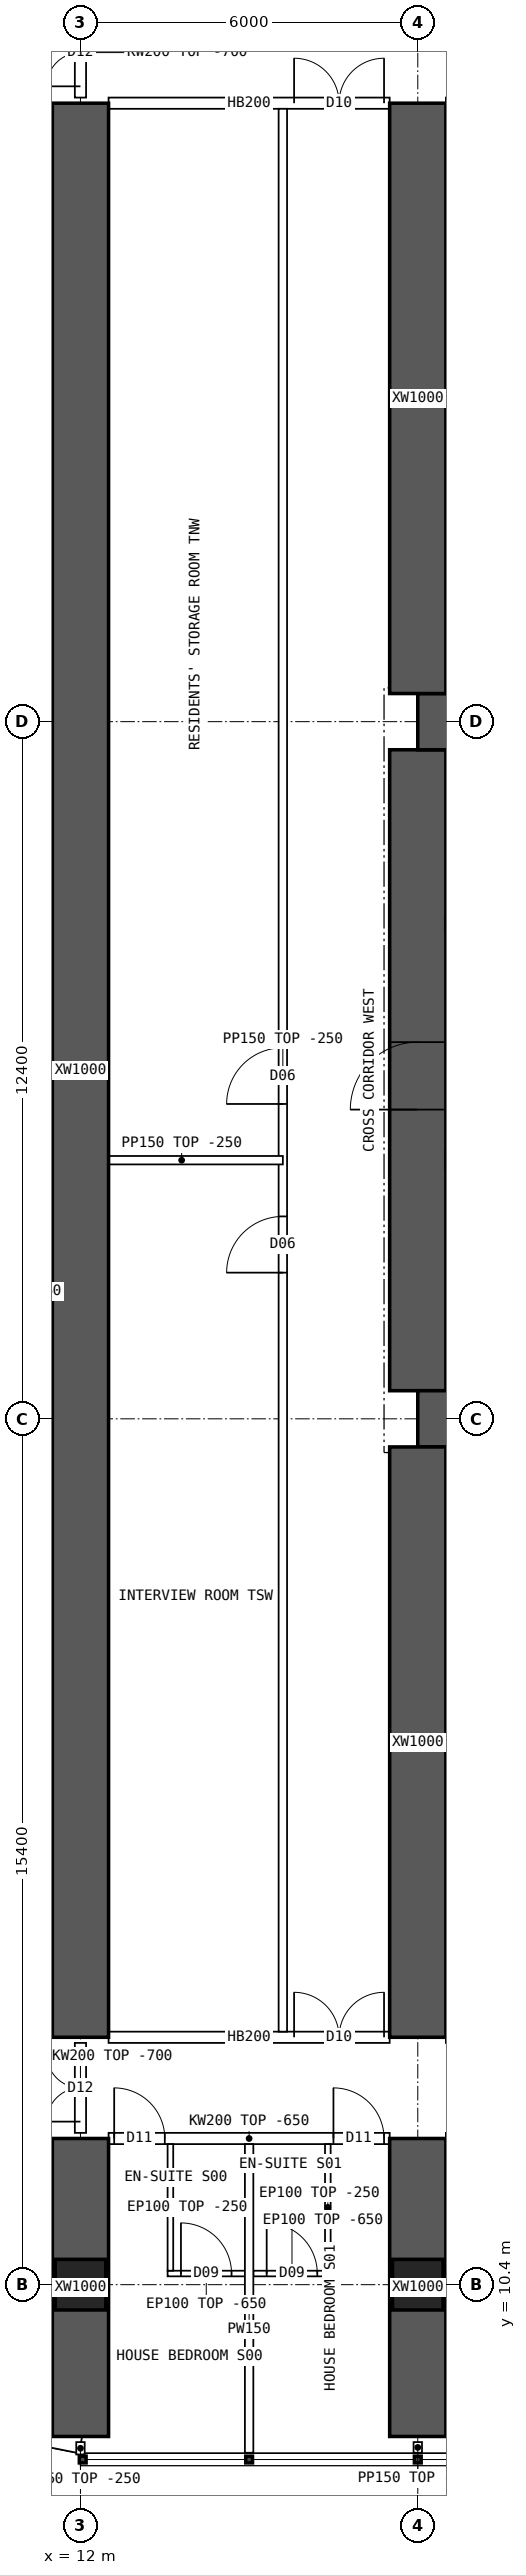
"""IFC4 building model, lengths in metres.
Left out: names, types, materials, properties, quantities, classifications, styles, units other than length and angle.
Written with IfcOpenShell. Run it as: python <this file> out.ifc"""

import sys

from ifc_helpers import new_model, si_unit, direction, frame, frame_2d, origin, origin_2d, place, context, subcontext, project, spatial, polyline, rectangle, hollow_rectangle, outline, extrude, element, fill, save


model = new_model("IFC4")
c1 = context("Model", 3, precision=1e-05, world=origin(), true_north=direction((0.0, 1.0)))
c2 = subcontext(c1, "Body", "Model", "MODEL_VIEW")
j1 = project(units=[si_unit("LENGTHUNIT", "METRE"), si_unit("PLANEANGLEUNIT", "RADIAN")], contexts=[c1])
p1 = place(None, origin())
s1 = spatial("IfcSite", under=j1, at=p1, CompositionType="ELEMENT")
p2 = place(p1, origin())
s2 = spatial("IfcBuilding", under=s1, at=p2, CompositionType="ELEMENT")
p3 = place(p2, frame((0.0, 0.0, 31.45)))
s3 = spatial("IfcBuildingStorey", under=s2, at=p3, CompositionType="ELEMENT", Elevation=31.45)
for number, where, z_axis, x_axis in (
    (1, (12.0, 10.4, 0.0), (0.0, 0.0, 1.0), (1.0, 0.0, 0.0)),
    (2, (18.0, 10.4, 0.0), (0.0, 0.0, 1.0), (1.0, 0.0, 0.0)),
):
    element("IfcColumn", number, at=place(p3, frame(where, z_axis=z_axis, x_axis=x_axis)), inside=s3, PredefinedType="COLUMN", context=c2, shape_type="SweptSolid", body=[
        extrude(hollow_rectangle(XDim=0.9, YDim=0.9, WallThickness=0.09, at=origin_2d()), origin(), (0.0, 0.0, 1.0), 3.75),
    ])
for number, where, z_axis, x_axis in (
    (3, (18.0, 25.8, 0.0), (0.0, 0.0, 1.0), (1.0, 0.0, 0.0)),
    (4, (18.0, 38.2, 0.0), (0.0, 0.0, 1.0), (1.0, 0.0, 0.0)),
):
    element("IfcWall", number, at=place(p3, frame(where, z_axis=z_axis, x_axis=x_axis)), inside=s3, PredefinedType="SHEAR", context=c2, shape_type="SweptSolid", body=[
        extrude(rectangle(XDim=48.0, YDim=1.0, at=frame_2d((24.0, 0.0))), origin(), (0.0, 0.0, 1.0), 3.75),
    ])
p4 = place(p3, frame((18.0, 26.3, 0.0), z_axis=(0.0, 0.0, 1.0), x_axis=(0.0, 1.0, 0.0)))
e5 = element("IfcWall", 5, at=p4, inside=s3, PredefinedType="SHEAR", context=c2, shape_type="SweptSolid", body=[
    extrude(rectangle(XDim=11.4, YDim=1.0, at=frame_2d((5.7, 0.0))), origin(), (0.0, 0.0, 1.0), 3.75),
])
p5 = place(p4, frame((5.0, 0.0, 0.0)))
e6 = element("IfcOpeningElement", 6, at=p5, cuts=e5, PredefinedType="OPENING", context=c2, shape_type="SweptSolid", body=[
    extrude(rectangle(XDim=1.2, YDim=2.1, at=frame_2d((0.6, 1.05))), frame((0.0, 0.51, 0.0), z_axis=(0.0, -1.0, 0.0), x_axis=(1.0, 0.0, 0.0)), (0.0, 0.0, 1.0), 1.02),
])
p6 = place(p3, frame((12.0, 7.7, 0.0), z_axis=(0.0, 0.0, 1.0), x_axis=(0.0, 1.0, 0.0)))
e7 = element("IfcWall", 7, at=p6, inside=s3, PredefinedType="SHEAR", context=c2, shape_type="SweptSolid", body=[
    extrude(rectangle(XDim=5.3, YDim=1.0, at=frame_2d((2.65, 0.0))), origin(), (0.0, 0.0, 1.0), 3.75),
])
p7 = place(p3, frame((12.0, 14.8, 0.0), z_axis=(0.0, 0.0, 1.0), x_axis=(0.0, 1.0, 0.0)))
e8 = element("IfcWall", 8, at=p7, inside=s3, PredefinedType="SHEAR", context=c2, shape_type="SweptSolid", body=[
    extrude(rectangle(XDim=34.4, YDim=1.0, at=frame_2d((17.2, 0.0))), origin(), (0.0, 0.0, 1.0), 3.75),
])
p8 = place(p3, frame((18.0, 7.7, 0.0), z_axis=(0.0, 0.0, 1.0), x_axis=(0.0, 1.0, 0.0)))
e9 = element("IfcWall", 9, at=p8, inside=s3, PredefinedType="SHEAR", context=c2, shape_type="SweptSolid", body=[
    extrude(rectangle(XDim=5.3, YDim=1.0, at=frame_2d((2.65, 0.0))), origin(), (0.0, 0.0, 1.0), 3.75),
])
for number, where, z_axis, x_axis in (
    (10, (18.0, 14.8, 0.0), (0.0, 0.0, 1.0), (0.0, 1.0, 0.0)),
    (11, (18.0, 38.7, 0.0), (0.0, 0.0, 1.0), (0.0, 1.0, 0.0)),
):
    element("IfcWall", number, at=place(p3, frame(where, z_axis=z_axis, x_axis=x_axis)), inside=s3, PredefinedType="SHEAR", context=c2, shape_type="SweptSolid", body=[
        extrude(rectangle(XDim=10.5, YDim=1.0, at=frame_2d((5.25, 0.0))), origin(), (0.0, 0.0, 1.0), 3.75),
    ])
p9 = place(p3, frame((8.843, 8.178, 0.0), z_axis=(0.0, 0.0, 1.0), x_axis=(0.980787251524, -0.195080412259, 0.0)))
e12 = element("IfcWall", 12, at=p9, inside=s3, PredefinedType="SOLIDWALL", context=c2, shape_type="SweptSolid", body=[
    extrude(outline(polyline([(-0.03, -0.15), (3.249, -0.15), (3.189, 0.15), (0.03, 0.15), (-0.03, -0.15)])), origin(), (0.0, 0.0, 1.0), 3.5),
])
p10 = place(p9, frame((0.909, 0.0, 0.9)))
e13 = element("IfcOpeningElement", 13, at=p10, cuts=e12, PredefinedType="OPENING", context=c2, shape_type="SweptSolid", body=[
    extrude(rectangle(XDim=1.4, YDim=1.8, at=frame_2d((0.7, 0.9))), frame((0.0, 0.16, 0.0), z_axis=(0.0, -1.0, 0.0), x_axis=(1.0, 0.0, 0.0)), (0.0, 0.0, 1.0), 0.32),
])
p11 = place(p3, frame((12.5, 13.0, 0.0), z_axis=(0.0, 0.0, 1.0), x_axis=(1.0, 0.0, 0.0)))
e14 = element("IfcWall", 14, at=p11, inside=s3, PredefinedType="SOLIDWALL", context=c2, shape_type="SweptSolid", body=[
    extrude(outline(polyline([(0.0, 0.0), (5.0, 0.0), (5.0, 3.1), (0.0, 3.1), (0.0, 0.0)])), frame((0.0, 0.1, 0.0), z_axis=(0.0, -1.0, 0.0), x_axis=(1.0, 0.0, 0.0)), (0.0, 0.0, 1.0), 0.2),
])
p12 = place(p11, frame((0.1, 0.0, 0.0)))
e15 = element("IfcOpeningElement", 15, at=p12, cuts=e14, PredefinedType="OPENING", context=c2, shape_type="SweptSolid", body=[
    extrude(rectangle(XDim=0.9, YDim=2.1, at=frame_2d((0.45, 1.05))), frame((0.0, 0.11, 0.0), z_axis=(0.0, -1.0, 0.0), x_axis=(1.0, 0.0, 0.0)), (0.0, 0.0, 1.0), 0.22),
])
p13 = place(p11, frame((4.0, 0.0, 0.0)))
e16 = element("IfcOpeningElement", 16, at=p13, cuts=e14, PredefinedType="OPENING", context=c2, shape_type="SweptSolid", body=[
    extrude(rectangle(XDim=0.9, YDim=2.1, at=frame_2d((0.45, 1.05))), frame((0.0, 0.11, 0.0), z_axis=(0.0, -1.0, 0.0), x_axis=(1.0, 0.0, 0.0)), (0.0, 0.0, 1.0), 0.22),
])
p14 = place(p3, frame((12.5, 14.8, 0.0), z_axis=(0.0, 0.0, 1.0), x_axis=(1.0, 0.0, 0.0)))
e17 = element("IfcWall", 17, at=p14, inside=s3, PredefinedType="SOLIDWALL", context=c2, shape_type="SweptSolid", body=[
    extrude(rectangle(XDim=5.0, YDim=0.2, at=frame_2d((2.5, 0.0))), origin(), (0.0, 0.0, 1.0), 3.5),
])
p15 = place(p14, frame((3.3, 0.0, 0.0)))
e18 = element("IfcOpeningElement", 18, at=p15, cuts=e17, PredefinedType="OPENING", context=c2, shape_type="SweptSolid", body=[
    extrude(rectangle(XDim=1.6, YDim=2.1, at=frame_2d((0.8, 1.05))), frame((0.0, 0.11, 0.0), z_axis=(0.0, -1.0, 0.0), x_axis=(1.0, 0.0, 0.0)), (0.0, 0.0, 1.0), 0.22),
])
p16 = place(p3, frame((12.5, 49.2, 0.0), z_axis=(0.0, 0.0, 1.0), x_axis=(1.0, 0.0, 0.0)))
e19 = element("IfcWall", 19, at=p16, inside=s3, PredefinedType="SOLIDWALL", context=c2, shape_type="SweptSolid", body=[
    extrude(rectangle(XDim=5.0, YDim=0.2, at=frame_2d((2.5, 0.0))), origin(), (0.0, 0.0, 1.0), 3.5),
])
p17 = place(p16, frame((3.3, 0.0, 0.0)))
e20 = element("IfcOpeningElement", 20, at=p17, cuts=e19, PredefinedType="OPENING", context=c2, shape_type="SweptSolid", body=[
    extrude(rectangle(XDim=1.6, YDim=2.1, at=frame_2d((0.8, 1.05))), frame((0.0, 0.11, 0.0), z_axis=(0.0, -1.0, 0.0), x_axis=(1.0, 0.0, 0.0)), (0.0, 0.0, 1.0), 0.22),
])
p18 = place(p3, frame((15.0, 7.41, 0.0), z_axis=(0.0, 0.0, 1.0), x_axis=(0.0, 1.0, 0.0)))
e21 = element("IfcWall", 21, at=p18, inside=s3, PredefinedType="PARTITIONING", context=c2, shape_type="SweptSolid", body=[
    extrude(outline(polyline([(0.0, 0.0), (5.49, 0.0), (5.49, 3.1), (5.442, 3.1), (5.44, 3.5), (3.192, 3.5), (3.19, 3.1), (2.792, 3.1), (2.79, 3.5), (0.0, 3.5), (0.0, 0.0)])), frame((0.0, 0.075, 0.0), z_axis=(0.0, -1.0, 0.0), x_axis=(1.0, 0.0, 0.0)), (0.0, 0.0, 1.0), 0.15),
])
p19 = place(p3, frame((14.925, 10.598, 0.0), z_axis=(0.0, 0.0, 1.0), x_axis=(-1.0, 0.0, 0.0)))
e22 = element("IfcWall", 22, at=p19, inside=s3, PredefinedType="PARTITIONING", context=c2, shape_type="SweptSolid", body=[
    extrude(outline(polyline([(0.0, 0.0), (1.375, 0.0), (1.375, 3.1), (0.0, 3.1), (0.0, 0.0)])), frame((0.0, 0.05, 0.0), z_axis=(0.0, -1.0, 0.0), x_axis=(1.0, 0.0, 0.0)), (0.0, 0.0, 1.0), 0.1),
])
p20 = place(p19, frame((0.238, 0.0, 0.0)))
e23 = element("IfcOpeningElement", 23, at=p20, cuts=e22, PredefinedType="OPENING", context=c2, shape_type="SweptSolid", body=[
    extrude(rectangle(XDim=0.9, YDim=2.1, at=frame_2d((0.45, 1.05))), frame((0.0, 0.06, 0.0), z_axis=(0.0, -1.0, 0.0), x_axis=(1.0, 0.0, 0.0)), (0.0, 0.0, 1.0), 0.12),
])
p21 = place(p3, frame((13.6, 10.648, 0.0), z_axis=(0.0, 0.0, 1.0), x_axis=(0.0, 1.0, 0.0)))
e24 = element("IfcWall", 24, at=p21, inside=s3, PredefinedType="PARTITIONING", context=c2, shape_type="SweptSolid", body=[
    extrude(outline(polyline([(0.0, 0.0), (2.252, 0.0), (2.252, 3.1), (2.204, 3.1), (2.202, 3.5), (0.0, 3.5), (0.0, 0.0)])), frame((0.0, 0.05, 0.0), z_axis=(0.0, -1.0, 0.0), x_axis=(1.0, 0.0, 0.0)), (0.0, 0.0, 1.0), 0.1),
])
p22 = place(p3, frame((16.45, 10.598, 0.0), z_axis=(0.0, 0.0, 1.0), x_axis=(-1.0, 0.0, 0.0)))
e25 = element("IfcWall", 25, at=p22, inside=s3, PredefinedType="PARTITIONING", context=c2, shape_type="SweptSolid", body=[
    extrude(outline(polyline([(0.0, 0.0), (1.375, 0.0), (1.375, 3.1), (0.0, 3.1), (0.0, 0.0)])), frame((0.0, 0.05, 0.0), z_axis=(0.0, -1.0, 0.0), x_axis=(1.0, 0.0, 0.0)), (0.0, 0.0, 1.0), 0.1),
])
p23 = place(p22, frame((0.238, 0.0, 0.0)))
e26 = element("IfcOpeningElement", 26, at=p23, cuts=e25, PredefinedType="OPENING", context=c2, shape_type="SweptSolid", body=[
    extrude(rectangle(XDim=0.9, YDim=2.1, at=frame_2d((0.45, 1.05))), frame((0.0, 0.06, 0.0), z_axis=(0.0, -1.0, 0.0), x_axis=(1.0, 0.0, 0.0)), (0.0, 0.0, 1.0), 0.12),
])
p24 = place(p3, frame((16.4, 10.648, 0.0), z_axis=(0.0, 0.0, 1.0), x_axis=(0.0, 1.0, 0.0)))
e27 = element("IfcWall", 27, at=p24, inside=s3, PredefinedType="PARTITIONING", context=c2, shape_type="SweptSolid", body=[
    extrude(outline(polyline([(0.0, 0.0), (2.252, 0.0), (2.252, 3.1), (2.204, 3.1), (2.202, 3.5), (0.0, 3.5), (0.0, 0.0)])), frame((0.0, 0.05, 0.0), z_axis=(0.0, -1.0, 0.0), x_axis=(1.0, 0.0, 0.0)), (0.0, 0.0, 1.0), 0.1),
])
p25 = place(p3, frame((15.6, 14.9, 0.0), z_axis=(0.0, 0.0, 1.0), x_axis=(0.0, 1.0, 0.0)))
e28 = element("IfcWall", 28, at=p25, inside=s3, PredefinedType="PARTITIONING", context=c2, shape_type="SweptSolid", body=[
    extrude(rectangle(XDim=34.2, YDim=0.15, at=frame_2d((17.1, 0.0))), origin(), (0.0, 0.0, 1.0), 3.5),
])
p26 = place(p25, frame((13.5, 0.0, 0.0)))
e29 = element("IfcOpeningElement", 29, at=p26, cuts=e28, PredefinedType="OPENING", context=c2, shape_type="SweptSolid", body=[
    extrude(rectangle(XDim=1.0, YDim=2.1, at=frame_2d((0.5, 1.05))), frame((0.0, 0.085, 0.0), z_axis=(0.0, -1.0, 0.0), x_axis=(1.0, 0.0, 0.0)), (0.0, 0.0, 1.0), 0.17),
])
p27 = place(p25, frame((16.5, 0.0, 0.0)))
e30 = element("IfcOpeningElement", 30, at=p27, cuts=e28, PredefinedType="OPENING", context=c2, shape_type="SweptSolid", body=[
    extrude(rectangle(XDim=1.0, YDim=2.1, at=frame_2d((0.5, 1.05))), frame((0.0, 0.085, 0.0), z_axis=(0.0, -1.0, 0.0), x_axis=(1.0, 0.0, 0.0)), (0.0, 0.0, 1.0), 0.17),
])
p28 = place(p3, frame((12.0, 30.4, 0.0), z_axis=(0.0, 0.0, 1.0), x_axis=(1.0, 0.0, 0.0)))
e31 = element("IfcWall", 31, at=p28, inside=s3, PredefinedType="PARTITIONING", context=c2, shape_type="SweptSolid", body=[
    extrude(rectangle(XDim=3.6, YDim=0.15, at=frame_2d((1.8, 0.0))), origin(), (0.0, 0.0, 1.0), 3.5),
])
p29 = place(p3, frame((3.905, 30.85, 0.0), z_axis=(0.0, 0.0, 1.0), x_axis=(1.0, 0.0, 0.0)))
e32 = element("IfcWall", 32, at=p29, inside=s3, PredefinedType="PARTITIONING", context=c2, shape_type="SweptSolid", body=[
    extrude(outline(polyline([(0.0, 0.0), (8.02, 0.0), (8.02, 3.5), (2.397, 3.5), (2.395, 3.05), (1.797, 3.05), (1.795, 3.5), (0.0, 3.5), (0.0, 0.0)])), frame((0.0, 0.075, 0.0), z_axis=(0.0, -1.0, 0.0), x_axis=(1.0, 0.0, 0.0)), (0.0, 0.0, 1.0), 0.15),
])
p30 = place(p3, frame((12.0, 13.1, 0.0), z_axis=(0.0, 0.0, 1.0), x_axis=(0.0, 1.0, 0.0)))
e33 = element("IfcWall", 33, at=p30, inside=s3, PredefinedType="SOLIDWALL", context=c2, shape_type="SweptSolid", body=[
    extrude(outline(polyline([(0.0, 0.0), (1.6, 0.0), (1.6, 3.05), (0.0, 3.05), (0.0, 0.0)])), frame((0.0, 0.1, 0.0), z_axis=(0.0, -1.0, 0.0), x_axis=(1.0, 0.0, 0.0)), (0.0, 0.0, 1.0), 0.2),
])
p31 = place(p30, frame((0.2, 0.0, 0.0)))
e34 = element("IfcOpeningElement", 34, at=p31, cuts=e33, PredefinedType="OPENING", context=c2, shape_type="SweptSolid", body=[
    extrude(rectangle(XDim=1.2, YDim=2.1, at=frame_2d((0.6, 1.05))), frame((0.0, 0.11, 0.0), z_axis=(0.0, -1.0, 0.0), x_axis=(1.0, 0.0, 0.0)), (0.0, 0.0, 1.0), 0.22),
])
p32 = place(p3, frame((12.0, 49.3, 0.0), z_axis=(0.0, 0.0, 1.0), x_axis=(0.0, 1.0, 0.0)))
e35 = element("IfcWall", 35, at=p32, inside=s3, PredefinedType="SOLIDWALL", context=c2, shape_type="SweptSolid", body=[
    extrude(outline(polyline([(0.0, 0.0), (1.6, 0.0), (1.6, 3.05), (0.0, 3.05), (0.0, 0.0)])), frame((0.0, 0.1, 0.0), z_axis=(0.0, -1.0, 0.0), x_axis=(1.0, 0.0, 0.0)), (0.0, 0.0, 1.0), 0.2),
])
p33 = place(p32, frame((0.2, 0.0, 0.0)))
e36 = element("IfcOpeningElement", 36, at=p33, cuts=e35, PredefinedType="OPENING", context=c2, shape_type="SweptSolid", body=[
    extrude(rectangle(XDim=1.2, YDim=2.1, at=frame_2d((0.6, 1.05))), frame((0.0, 0.11, 0.0), z_axis=(0.0, -1.0, 0.0), x_axis=(1.0, 0.0, 0.0)), (0.0, 0.0, 1.0), 0.22),
])
p34 = place(p3, frame((12.0, 7.6, 0.0), z_axis=(0.0, 0.0, 1.0), x_axis=(0.0, -1.0, 0.0)))
e37 = element("IfcWall", 37, at=p34, inside=s3, PredefinedType="PARTITIONING", context=c2, shape_type="SweptSolid", body=[
    extrude(rectangle(XDim=0.22, YDim=0.15, at=frame_2d((0.11, 0.0))), origin(), (0.0, 0.0, 1.0), 3.5),
])
p35 = place(p3, frame((18.0, 7.6, 0.0), z_axis=(0.0, 0.0, 1.0), x_axis=(0.0, -1.0, 0.0)))
e38 = element("IfcWall", 38, at=p35, inside=s3, PredefinedType="PARTITIONING", context=c2, shape_type="SweptSolid", body=[
    extrude(rectangle(XDim=0.19, YDim=0.15, at=frame_2d((0.095, 0.0))), origin(), (0.0, 0.0, 1.0), 3.5),
])
p36 = place(p5, origin())
e39 = element("IfcDoor", 39, at=p36, inside=s3, OperationType="SINGLE_SWING_LEFT", PredefinedType="DOOR", context=c2, shape_type="SweptSolid", body=[
    extrude(rectangle(XDim=1.2, YDim=2.1, at=frame_2d((0.6, 1.05))), frame((0.0, 0.025, 0.0), z_axis=(0.0, -1.0, 0.0), x_axis=(1.0, 0.0, 0.0)), (0.0, 0.0, 1.0), 0.05),
])
fill(e6, e39)
p37 = place(p15, origin())
e40 = element("IfcDoor", 40, at=p37, inside=s3, OperationType="DOUBLE_DOOR_SINGLE_SWING", PredefinedType="DOOR", context=c2, shape_type="SweptSolid", body=[
    extrude(rectangle(XDim=1.6, YDim=2.1, at=frame_2d((0.8, 1.05))), frame((0.0, 0.025, 0.0), z_axis=(0.0, -1.0, 0.0), x_axis=(1.0, 0.0, 0.0)), (0.0, 0.0, 1.0), 0.05),
])
fill(e18, e40)
p38 = place(p17, origin())
e41 = element("IfcDoor", 41, at=p38, inside=s3, OperationType="DOUBLE_DOOR_SINGLE_SWING", PredefinedType="DOOR", context=c2, shape_type="SweptSolid", body=[
    extrude(rectangle(XDim=1.6, YDim=2.1, at=frame_2d((0.8, 1.05))), frame((0.0, 0.025, 0.0), z_axis=(0.0, -1.0, 0.0), x_axis=(1.0, 0.0, 0.0)), (0.0, 0.0, 1.0), 0.05),
])
fill(e20, e41)
p39 = place(p20, origin())
e42 = element("IfcDoor", 42, at=p39, inside=s3, OperationType="SINGLE_SWING_RIGHT", PredefinedType="DOOR", context=c2, shape_type="SweptSolid", body=[
    extrude(rectangle(XDim=0.9, YDim=2.1, at=frame_2d((0.45, 1.05))), frame((0.0, 0.025, 0.0), z_axis=(0.0, -1.0, 0.0), x_axis=(1.0, 0.0, 0.0)), (0.0, 0.0, 1.0), 0.05),
])
fill(e23, e42)
p40 = place(p12, origin())
e43 = element("IfcDoor", 43, at=p40, inside=s3, OperationType="SINGLE_SWING_LEFT", PredefinedType="DOOR", context=c2, shape_type="SweptSolid", body=[
    extrude(rectangle(XDim=0.9, YDim=2.1, at=frame_2d((0.45, 1.05))), frame((0.0, 0.025, 0.0), z_axis=(0.0, -1.0, 0.0), x_axis=(1.0, 0.0, 0.0)), (0.0, 0.0, 1.0), 0.05),
])
fill(e15, e43)
p41 = place(p23, origin())
e44 = element("IfcDoor", 44, at=p41, inside=s3, OperationType="SINGLE_SWING_RIGHT", PredefinedType="DOOR", context=c2, shape_type="SweptSolid", body=[
    extrude(rectangle(XDim=0.9, YDim=2.1, at=frame_2d((0.45, 1.05))), frame((0.0, 0.025, 0.0), z_axis=(0.0, -1.0, 0.0), x_axis=(1.0, 0.0, 0.0)), (0.0, 0.0, 1.0), 0.05),
])
fill(e26, e44)
p42 = place(p13, origin())
e45 = element("IfcDoor", 45, at=p42, inside=s3, OperationType="SINGLE_SWING_LEFT", PredefinedType="DOOR", context=c2, shape_type="SweptSolid", body=[
    extrude(rectangle(XDim=0.9, YDim=2.1, at=frame_2d((0.45, 1.05))), frame((0.0, 0.025, 0.0), z_axis=(0.0, -1.0, 0.0), x_axis=(1.0, 0.0, 0.0)), (0.0, 0.0, 1.0), 0.05),
])
fill(e16, e45)
p43 = place(p26, origin())
e46 = element("IfcDoor", 46, at=p43, inside=s3, OperationType="SINGLE_SWING_LEFT", PredefinedType="DOOR", context=c2, shape_type="SweptSolid", body=[
    extrude(rectangle(XDim=1.0, YDim=2.1, at=frame_2d((0.5, 1.05))), frame((0.0, 0.025, 0.0), z_axis=(0.0, -1.0, 0.0), x_axis=(1.0, 0.0, 0.0)), (0.0, 0.0, 1.0), 0.05),
])
fill(e29, e46)
p44 = place(p27, origin())
e47 = element("IfcDoor", 47, at=p44, inside=s3, OperationType="SINGLE_SWING_LEFT", PredefinedType="DOOR", context=c2, shape_type="SweptSolid", body=[
    extrude(rectangle(XDim=1.0, YDim=2.1, at=frame_2d((0.5, 1.05))), frame((0.0, 0.025, 0.0), z_axis=(0.0, -1.0, 0.0), x_axis=(1.0, 0.0, 0.0)), (0.0, 0.0, 1.0), 0.05),
])
fill(e30, e47)
p45 = place(p31, origin())
e48 = element("IfcDoor", 48, at=p45, inside=s3, OperationType="DOUBLE_DOOR_SINGLE_SWING", PredefinedType="DOOR", context=c2, shape_type="SweptSolid", body=[
    extrude(rectangle(XDim=1.2, YDim=2.1, at=frame_2d((0.6, 1.05))), frame((0.0, 0.025, 0.0), z_axis=(0.0, -1.0, 0.0), x_axis=(1.0, 0.0, 0.0)), (0.0, 0.0, 1.0), 0.05),
])
fill(e34, e48)
p46 = place(p33, origin())
e49 = element("IfcDoor", 49, at=p46, inside=s3, OperationType="DOUBLE_DOOR_SINGLE_SWING", PredefinedType="DOOR", context=c2, shape_type="SweptSolid", body=[
    extrude(rectangle(XDim=1.2, YDim=2.1, at=frame_2d((0.6, 1.05))), frame((0.0, 0.025, 0.0), z_axis=(0.0, -1.0, 0.0), x_axis=(1.0, 0.0, 0.0)), (0.0, 0.0, 1.0), 0.05),
])
fill(e36, e49)
save(model, sys.argv[1])
